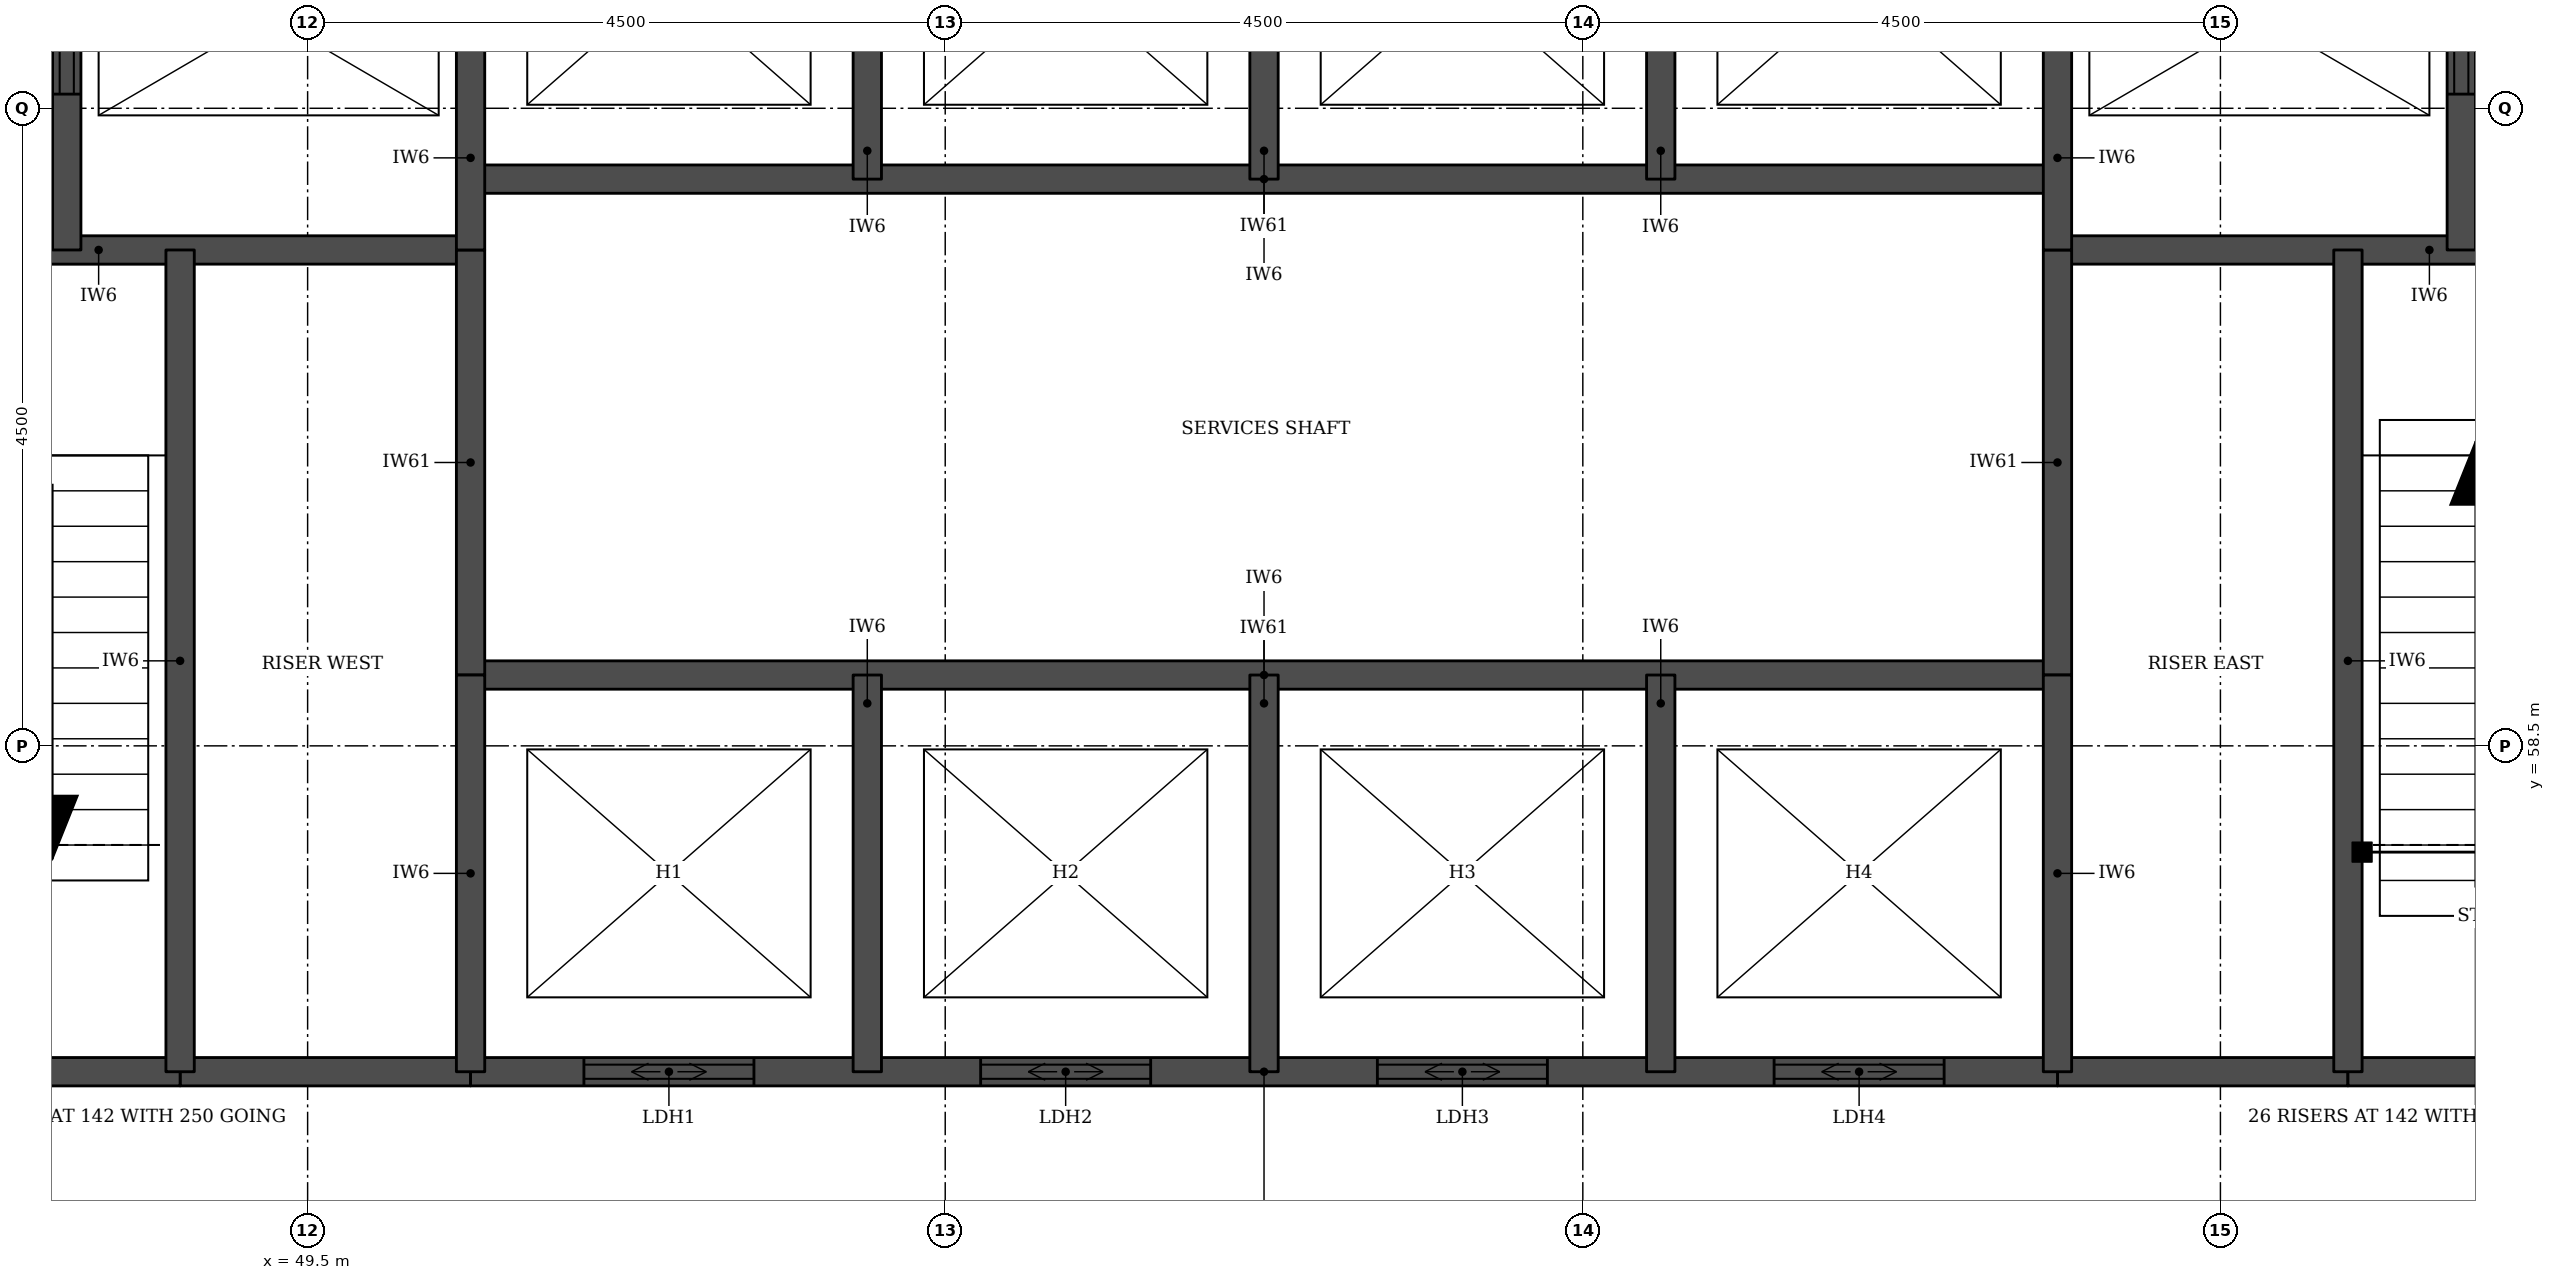
"""IFC4 building model, lengths in metres.
Left out: names, types, materials, properties, quantities, classifications, styles, units other than length and angle.
Written with IfcOpenShell. Run it as: python <this file> out.ifc"""

import sys

from ifc_helpers import new_model, si_unit, direction, frame, frame_2d, origin, place, context, subcontext, project, spatial, rectangle, extrude, element, fill, save


model = new_model("IFC4")
c1 = context("Model", 3, precision=1e-05, world=origin(), true_north=direction((0.0, 1.0)))
c2 = subcontext(c1, "Body", "Model", "MODEL_VIEW")
j1 = project(units=[si_unit("LENGTHUNIT", "METRE"), si_unit("PLANEANGLEUNIT", "RADIAN")], contexts=[c1])
p1 = place(None, origin())
s1 = spatial("IfcSite", under=j1, at=p1, CompositionType="ELEMENT")
p2 = place(p1, origin())
s2 = spatial("IfcBuilding", under=s1, at=p2, CompositionType="ELEMENT")
p3 = place(p2, frame((0.0, 0.0, 215.6)))
s3 = spatial("IfcBuildingStorey", under=s2, at=p3, CompositionType="ELEMENT", Elevation=215.6)
for number, where, z_axis, x_axis in (
    (1, (48.6, 56.2, 0.0), (0.0, 0.0, 1.0), (1.0, 0.0, 0.0)),
    (2, (61.85, 56.2, 0.0), (0.0, 0.0, 1.0), (1.0, 0.0, 0.0)),
):
    element("IfcWall", number, at=place(p3, frame(where, z_axis=z_axis, x_axis=x_axis)), inside=s3, PredefinedType="SOLIDWALL", context=c2, shape_type="SweptSolid", body=[
        extrude(rectangle(XDim=2.05, YDim=0.2, at=frame_2d((1.025, 0.0))), origin(), (0.0, 0.0, 1.0), 3.55),
    ])
p4 = place(p3, frame((45.4, 56.2, 0.0), z_axis=(0.0, 0.0, 1.0), x_axis=(1.0, 0.0, 0.0)))
e3 = element("IfcWall", 3, at=p4, inside=s3, PredefinedType="SOLIDWALL", context=c2, shape_type="SweptSolid", body=[
    extrude(rectangle(XDim=3.2, YDim=0.2, at=frame_2d((1.6, 0.0))), origin(), (0.0, 0.0, 1.0), 3.55),
])
p5 = place(p3, frame((50.65, 56.2, 0.0), z_axis=(0.0, 0.0, 1.0), x_axis=(1.0, 0.0, 0.0)))
e4 = element("IfcWall", 4, at=p5, inside=s3, PredefinedType="SOLIDWALL", context=c2, shape_type="SweptSolid", body=[
    extrude(rectangle(XDim=11.2, YDim=0.2, at=frame_2d((5.6, 0.0))), origin(), (0.0, 0.0, 1.0), 3.55),
])
p6 = place(p5, frame((0.8, 0.0, 0.0)))
e5 = element("IfcOpeningElement", 5, at=p6, cuts=e4, PredefinedType="OPENING", context=c2, shape_type="SweptSolid", body=[
    extrude(rectangle(XDim=1.2, YDim=2.1, at=frame_2d((0.6, 1.05))), frame((0.0, 0.11, 0.0), z_axis=(0.0, -1.0, 0.0), x_axis=(1.0, 0.0, 0.0)), (0.0, 0.0, 1.0), 0.22),
])
p7 = place(p5, frame((3.6, 0.0, 0.0)))
e6 = element("IfcOpeningElement", 6, at=p7, cuts=e4, PredefinedType="OPENING", context=c2, shape_type="SweptSolid", body=[
    extrude(rectangle(XDim=1.2, YDim=2.1, at=frame_2d((0.6, 1.05))), frame((0.0, 0.11, 0.0), z_axis=(0.0, -1.0, 0.0), x_axis=(1.0, 0.0, 0.0)), (0.0, 0.0, 1.0), 0.22),
])
p8 = place(p5, frame((6.4, 0.0, 0.0)))
e7 = element("IfcOpeningElement", 7, at=p8, cuts=e4, PredefinedType="OPENING", context=c2, shape_type="SweptSolid", body=[
    extrude(rectangle(XDim=1.2, YDim=2.1, at=frame_2d((0.6, 1.05))), frame((0.0, 0.11, 0.0), z_axis=(0.0, -1.0, 0.0), x_axis=(1.0, 0.0, 0.0)), (0.0, 0.0, 1.0), 0.22),
])
p9 = place(p5, frame((9.2, 0.0, 0.0)))
e8 = element("IfcOpeningElement", 8, at=p9, cuts=e4, PredefinedType="OPENING", context=c2, shape_type="SweptSolid", body=[
    extrude(rectangle(XDim=1.2, YDim=2.1, at=frame_2d((0.6, 1.05))), frame((0.0, 0.11, 0.0), z_axis=(0.0, -1.0, 0.0), x_axis=(1.0, 0.0, 0.0)), (0.0, 0.0, 1.0), 0.22),
])
p10 = place(p3, frame((63.9, 56.2, 0.0), z_axis=(0.0, 0.0, 1.0), x_axis=(1.0, 0.0, 0.0)))
e9 = element("IfcWall", 9, at=p10, inside=s3, PredefinedType="SOLIDWALL", context=c2, shape_type="SweptSolid", body=[
    extrude(rectangle(XDim=3.2, YDim=0.2, at=frame_2d((1.6, 0.0))), origin(), (0.0, 0.0, 1.0), 3.55),
])
p11 = place(p3, frame((50.65, 59.0, 0.0), z_axis=(0.0, 0.0, 1.0), x_axis=(1.0, 0.0, 0.0)))
e10 = element("IfcWall", 10, at=p11, inside=s3, PredefinedType="SOLIDWALL", context=c2, shape_type="SweptSolid", body=[
    extrude(rectangle(XDim=11.2, YDim=0.2, at=frame_2d((5.6, 0.0))), origin(), (0.0, 0.0, 1.0), 3.7),
])
for number, where, z_axis, x_axis in (
    (11, (45.4, 62.0, 0.0), (0.0, 0.0, 1.0), (1.0, 0.0, 0.0)),
    (12, (61.85, 62.0, 0.0), (0.0, 0.0, 1.0), (1.0, 0.0, 0.0)),
):
    element("IfcWall", number, at=place(p3, frame(where, z_axis=z_axis, x_axis=x_axis)), inside=s3, PredefinedType="SOLIDWALL", context=c2, shape_type="SweptSolid", body=[
        extrude(rectangle(XDim=5.25, YDim=0.2, at=frame_2d((2.625, 0.0))), origin(), (0.0, 0.0, 1.0), 3.55),
    ])
p12 = place(p3, frame((50.65, 62.5, 0.0), z_axis=(0.0, 0.0, 1.0), x_axis=(1.0, 0.0, 0.0)))
e13 = element("IfcWall", 13, at=p12, inside=s3, PredefinedType="SOLIDWALL", context=c2, shape_type="SweptSolid", body=[
    extrude(rectangle(XDim=11.2, YDim=0.2, at=frame_2d((5.6, 0.0))), origin(), (0.0, 0.0, 1.0), 3.7),
])
p13 = place(p3, frame((47.8, 62.0, 0.0), z_axis=(0.0, 0.0, 1.0), x_axis=(0.0, 1.0, 0.0)))
e14 = element("IfcWall", 14, at=p13, inside=s3, PredefinedType="SOLIDWALL", context=c2, shape_type="SweptSolid", body=[
    extrude(rectangle(XDim=3.3, YDim=0.2, at=frame_2d((1.65, 0.0))), origin(), (0.0, 0.0, 1.0), 3.55),
])
p14 = place(p13, frame((1.1, 0.0, 0.0)))
e15 = element("IfcOpeningElement", 15, at=p14, cuts=e14, PredefinedType="OPENING", context=c2, shape_type="SweptSolid", body=[
    extrude(rectangle(XDim=1.1, YDim=2.1, at=frame_2d((0.55, 1.05))), frame((0.0, 0.11, 0.0), z_axis=(0.0, -1.0, 0.0), x_axis=(1.0, 0.0, 0.0)), (0.0, 0.0, 1.0), 0.22),
])
p15 = place(p3, frame((48.6, 56.2, 0.0), z_axis=(0.0, 0.0, 1.0), x_axis=(0.0, 1.0, 0.0)))
e16 = element("IfcWall", 16, at=p15, inside=s3, PredefinedType="SOLIDWALL", context=c2, shape_type="SweptSolid", body=[
    extrude(rectangle(XDim=5.8, YDim=0.2, at=frame_2d((2.9, 0.0))), origin(), (0.0, 0.0, 1.0), 3.55),
])
p16 = place(p3, frame((50.65, 59.0, 0.0), z_axis=(0.0, 0.0, 1.0), x_axis=(0.0, 1.0, 0.0)))
e17 = element("IfcWall", 17, at=p16, inside=s3, PredefinedType="SOLIDWALL", context=c2, shape_type="SweptSolid", body=[
    extrude(rectangle(XDim=3.0, YDim=0.2, at=frame_2d((1.5, 0.0))), origin(), (0.0, 0.0, 1.0), 3.7),
])
p17 = place(p3, frame((50.65, 56.2, 0.0), z_axis=(0.0, 0.0, 1.0), x_axis=(0.0, 1.0, 0.0)))
e18 = element("IfcWall", 18, at=p17, inside=s3, PredefinedType="SOLIDWALL", context=c2, shape_type="SweptSolid", body=[
    extrude(rectangle(XDim=2.8, YDim=0.2, at=frame_2d((1.4, 0.0))), origin(), (0.0, 0.0, 1.0), 3.55),
])
p18 = place(p3, frame((50.65, 62.0, 0.0), z_axis=(0.0, 0.0, 1.0), x_axis=(0.0, 1.0, 0.0)))
e19 = element("IfcWall", 19, at=p18, inside=s3, PredefinedType="SOLIDWALL", context=c2, shape_type="SweptSolid", body=[
    extrude(rectangle(XDim=3.3, YDim=0.2, at=frame_2d((1.65, 0.0))), origin(), (0.0, 0.0, 1.0), 3.55),
])
for number, where, z_axis, x_axis in (
    (20, (53.45, 56.2, 0.0), (0.0, 0.0, 1.0), (0.0, 1.0, 0.0)),
    (21, (53.45, 62.5, 0.0), (0.0, 0.0, 1.0), (0.0, 1.0, 0.0)),
    (22, (56.25, 56.2, 0.0), (0.0, 0.0, 1.0), (0.0, 1.0, 0.0)),
    (23, (56.25, 62.5, 0.0), (0.0, 0.0, 1.0), (0.0, 1.0, 0.0)),
    (24, (59.05, 56.2, 0.0), (0.0, 0.0, 1.0), (0.0, 1.0, 0.0)),
    (25, (59.05, 62.5, 0.0), (0.0, 0.0, 1.0), (0.0, 1.0, 0.0)),
):
    element("IfcWall", number, at=place(p3, frame(where, z_axis=z_axis, x_axis=x_axis)), inside=s3, PredefinedType="SOLIDWALL", context=c2, shape_type="SweptSolid", body=[
        extrude(rectangle(XDim=2.8, YDim=0.2, at=frame_2d((1.4, 0.0))), origin(), (0.0, 0.0, 1.0), 3.55),
    ])
p19 = place(p3, frame((61.85, 59.0, 0.0), z_axis=(0.0, 0.0, 1.0), x_axis=(0.0, 1.0, 0.0)))
e26 = element("IfcWall", 26, at=p19, inside=s3, PredefinedType="SOLIDWALL", context=c2, shape_type="SweptSolid", body=[
    extrude(rectangle(XDim=3.0, YDim=0.2, at=frame_2d((1.5, 0.0))), origin(), (0.0, 0.0, 1.0), 3.7),
])
p20 = place(p3, frame((61.85, 56.2, 0.0), z_axis=(0.0, 0.0, 1.0), x_axis=(0.0, 1.0, 0.0)))
e27 = element("IfcWall", 27, at=p20, inside=s3, PredefinedType="SOLIDWALL", context=c2, shape_type="SweptSolid", body=[
    extrude(rectangle(XDim=2.8, YDim=0.2, at=frame_2d((1.4, 0.0))), origin(), (0.0, 0.0, 1.0), 3.55),
])
p21 = place(p3, frame((61.85, 62.0, 0.0), z_axis=(0.0, 0.0, 1.0), x_axis=(0.0, 1.0, 0.0)))
e28 = element("IfcWall", 28, at=p21, inside=s3, PredefinedType="SOLIDWALL", context=c2, shape_type="SweptSolid", body=[
    extrude(rectangle(XDim=3.3, YDim=0.2, at=frame_2d((1.65, 0.0))), origin(), (0.0, 0.0, 1.0), 3.55),
])
p22 = place(p3, frame((63.9, 56.2, 0.0), z_axis=(0.0, 0.0, 1.0), x_axis=(0.0, 1.0, 0.0)))
e29 = element("IfcWall", 29, at=p22, inside=s3, PredefinedType="SOLIDWALL", context=c2, shape_type="SweptSolid", body=[
    extrude(rectangle(XDim=5.8, YDim=0.2, at=frame_2d((2.9, 0.0))), origin(), (0.0, 0.0, 1.0), 3.55),
])
p23 = place(p3, frame((64.7, 62.0, 0.0), z_axis=(0.0, 0.0, 1.0), x_axis=(0.0, 1.0, 0.0)))
e30 = element("IfcWall", 30, at=p23, inside=s3, PredefinedType="SOLIDWALL", context=c2, shape_type="SweptSolid", body=[
    extrude(rectangle(XDim=3.3, YDim=0.2, at=frame_2d((1.65, 0.0))), origin(), (0.0, 0.0, 1.0), 3.55),
])
p24 = place(p23, frame((1.1, 0.0, 0.0)))
e31 = element("IfcOpeningElement", 31, at=p24, cuts=e30, PredefinedType="OPENING", context=c2, shape_type="SweptSolid", body=[
    extrude(rectangle(XDim=1.1, YDim=2.1, at=frame_2d((0.55, 1.05))), frame((0.0, 0.11, 0.0), z_axis=(0.0, -1.0, 0.0), x_axis=(1.0, 0.0, 0.0)), (0.0, 0.0, 1.0), 0.22),
])
p25 = place(p6, origin())
e32 = element("IfcDoor", 32, at=p25, inside=s3, OperationType="DOUBLE_DOOR_SLIDING", PredefinedType="DOOR", context=c2, shape_type="SweptSolid", body=[
    extrude(rectangle(XDim=1.2, YDim=2.1, at=frame_2d((0.6, 1.05))), frame((0.0, 0.025, 0.0), z_axis=(0.0, -1.0, 0.0), x_axis=(1.0, 0.0, 0.0)), (0.0, 0.0, 1.0), 0.05),
])
fill(e5, e32)
p26 = place(p7, origin())
e33 = element("IfcDoor", 33, at=p26, inside=s3, OperationType="DOUBLE_DOOR_SLIDING", PredefinedType="DOOR", context=c2, shape_type="SweptSolid", body=[
    extrude(rectangle(XDim=1.2, YDim=2.1, at=frame_2d((0.6, 1.05))), frame((0.0, 0.025, 0.0), z_axis=(0.0, -1.0, 0.0), x_axis=(1.0, 0.0, 0.0)), (0.0, 0.0, 1.0), 0.05),
])
fill(e6, e33)
p27 = place(p8, origin())
e34 = element("IfcDoor", 34, at=p27, inside=s3, OperationType="DOUBLE_DOOR_SLIDING", PredefinedType="DOOR", context=c2, shape_type="SweptSolid", body=[
    extrude(rectangle(XDim=1.2, YDim=2.1, at=frame_2d((0.6, 1.05))), frame((0.0, 0.025, 0.0), z_axis=(0.0, -1.0, 0.0), x_axis=(1.0, 0.0, 0.0)), (0.0, 0.0, 1.0), 0.05),
])
fill(e7, e34)
p28 = place(p9, origin())
e35 = element("IfcDoor", 35, at=p28, inside=s3, OperationType="DOUBLE_DOOR_SLIDING", PredefinedType="DOOR", context=c2, shape_type="SweptSolid", body=[
    extrude(rectangle(XDim=1.2, YDim=2.1, at=frame_2d((0.6, 1.05))), frame((0.0, 0.025, 0.0), z_axis=(0.0, -1.0, 0.0), x_axis=(1.0, 0.0, 0.0)), (0.0, 0.0, 1.0), 0.05),
])
fill(e8, e35)
p29 = place(p14, origin())
e36 = element("IfcDoor", 36, at=p29, inside=s3, OperationType="DOUBLE_DOOR_SLIDING", PredefinedType="DOOR", context=c2, shape_type="SweptSolid", body=[
    extrude(rectangle(XDim=1.1, YDim=2.1, at=frame_2d((0.55, 1.05))), frame((0.0, 0.025, 0.0), z_axis=(0.0, -1.0, 0.0), x_axis=(1.0, 0.0, 0.0)), (0.0, 0.0, 1.0), 0.05),
])
fill(e15, e36)
p30 = place(p24, origin())
e37 = element("IfcDoor", 37, at=p30, inside=s3, OperationType="DOUBLE_DOOR_SLIDING", PredefinedType="DOOR", context=c2, shape_type="SweptSolid", body=[
    extrude(rectangle(XDim=1.1, YDim=2.1, at=frame_2d((0.55, 1.05))), frame((0.0, 0.025, 0.0), z_axis=(0.0, -1.0, 0.0), x_axis=(1.0, 0.0, 0.0)), (0.0, 0.0, 1.0), 0.05),
])
fill(e31, e37)
save(model, sys.argv[1])
